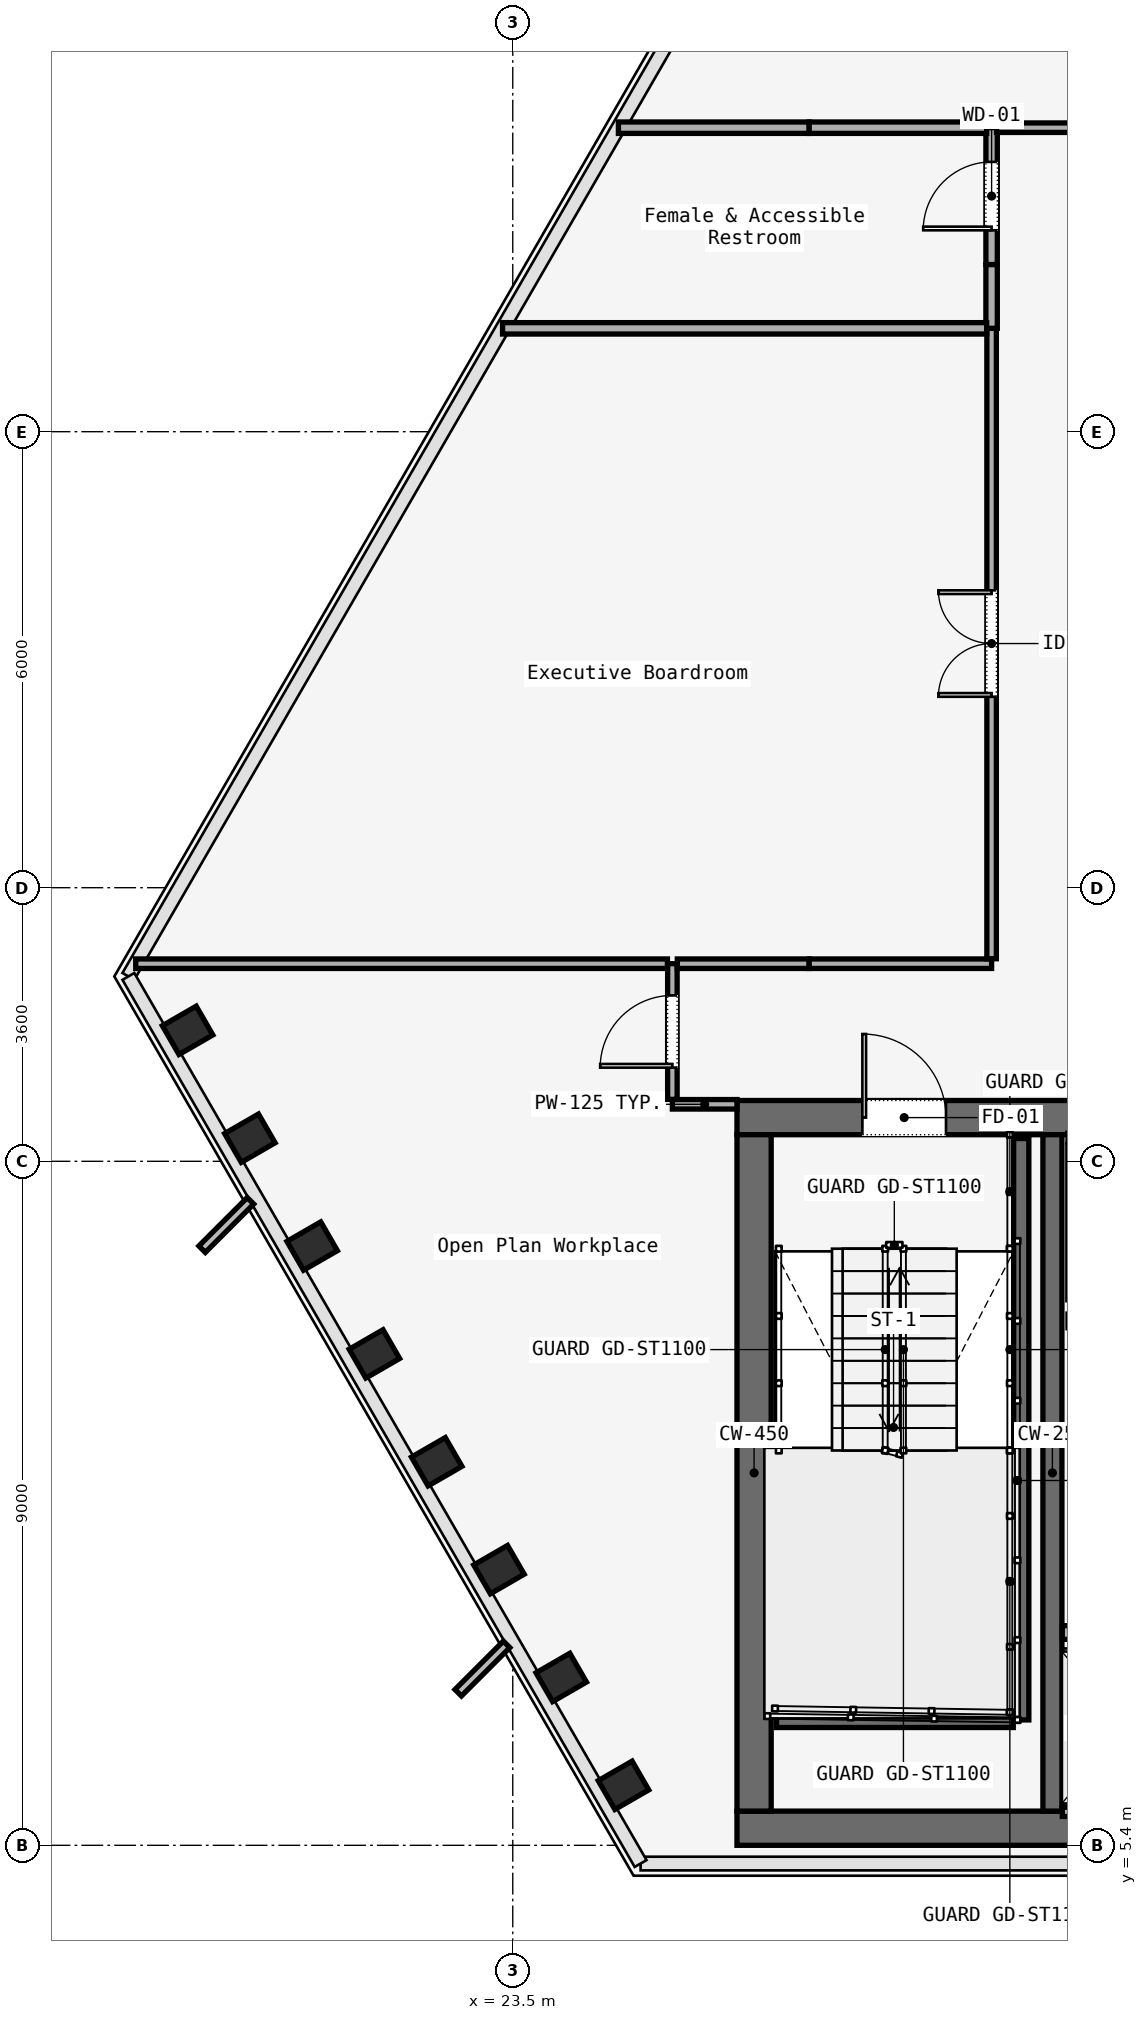
"""IFC4 building model, lengths in metres.
Left out: names, types, materials, properties, quantities, classifications, styles, units other than length and angle.
Written with IfcOpenShell. Run it as: python <this file> out.ifc"""

import sys

from ifc_helpers import new_model, si_unit, direction, frame, frame_2d, origin, origin_2d, place, context, subcontext, project, spatial, rectangle, i_section, extrude, element, fill, save


model = new_model("IFC4")
c1 = context("Model", 3, precision=1e-05, world=origin(), true_north=direction((0.0, 1.0)))
c2 = subcontext(c1, "Body", "Model", "MODEL_VIEW")
j1 = project(units=[si_unit("LENGTHUNIT", "METRE"), si_unit("PLANEANGLEUNIT", "RADIAN")], contexts=[c1])
p1 = place(None, origin())
s1 = spatial("IfcSite", under=j1, at=p1, CompositionType="ELEMENT")
p2 = place(p1, origin())
s2 = spatial("IfcBuilding", under=s1, at=p2, CompositionType="ELEMENT")
p3 = place(p2, frame((0.0, 0.0, 100.6)))
s3 = spatial("IfcBuildingStorey", under=s2, at=p3, CompositionType="ELEMENT", Elevation=100.6)
p4 = place(p3, frame((26.45, 14.975, 0.0), z_axis=(0.0, 0.0, 1.0), x_axis=(1.0, 0.0, 0.0)))
e1 = element("IfcWall", 1, at=p4, inside=s3, PredefinedType="SOLIDWALL", context=c2, shape_type="SweptSolid", body=[
    extrude(rectangle(XDim=31.1, YDim=0.45, at=frame_2d((15.55, 0.0))), origin(), (0.0, 0.0, 1.0), 3.58),
])
p5 = place(p4, frame((1.65, 0.0, 0.0)))
e2 = element("IfcOpeningElement", 2, at=p5, cuts=e1, PredefinedType="OPENING", context=c2, shape_type="SweptSolid", body=[
    extrude(rectangle(XDim=1.1, YDim=2.2, at=frame_2d((0.55, 1.1))), frame((0.0, 0.225, 0.0), z_axis=(0.0, -1.0, 0.0), x_axis=(1.0, 0.0, 0.0)), (0.0, 0.0, 1.0), 0.45),
])
p6 = place(p4, frame((13.65, 0.0, 0.0)))
e3 = element("IfcOpeningElement", 3, at=p6, cuts=e1, PredefinedType="OPENING", context=c2, shape_type="SweptSolid", body=[
    extrude(rectangle(XDim=1.1, YDim=2.2, at=frame_2d((0.55, 1.1))), frame((0.0, 0.225, 0.0), z_axis=(0.0, -1.0, 0.0), x_axis=(1.0, 0.0, 0.0)), (0.0, 0.0, 1.0), 0.45),
])
p7 = place(p4, frame((25.55, 0.0, 0.0)))
e4 = element("IfcOpeningElement", 4, at=p7, cuts=e1, PredefinedType="OPENING", context=c2, shape_type="SweptSolid", body=[
    extrude(rectangle(XDim=1.1, YDim=2.2, at=frame_2d((0.55, 1.1))), frame((0.0, 0.225, 0.0), z_axis=(0.0, -1.0, 0.0), x_axis=(1.0, 0.0, 0.0)), (0.0, 0.0, 1.0), 0.45),
])
p8 = place(p4, frame((10.7, 0.0, 0.0)))
e5 = element("IfcOpeningElement", 5, at=p8, cuts=e1, PredefinedType="OPENING", context=c2, shape_type="SweptSolid", body=[
    extrude(rectangle(XDim=1.4, YDim=2.2, at=frame_2d((0.7, 1.1))), frame((0.0, 0.225, 0.0), z_axis=(0.0, -1.0, 0.0), x_axis=(1.0, 0.0, 0.0)), (0.0, 0.0, 1.0), 0.45),
])
p9 = place(p4, frame((19.35, 0.0, 0.0)))
e6 = element("IfcOpeningElement", 6, at=p9, cuts=e1, PredefinedType="OPENING", context=c2, shape_type="SweptSolid", body=[
    extrude(rectangle(XDim=1.1, YDim=2.2, at=frame_2d((0.55, 1.1))), frame((0.0, 0.225, 0.0), z_axis=(0.0, -1.0, 0.0), x_axis=(1.0, 0.0, 0.0)), (0.0, 0.0, 1.0), 0.45),
])
p10 = place(p4, frame((21.4, 0.0, 0.0)))
e7 = element("IfcOpeningElement", 7, at=p10, cuts=e1, PredefinedType="OPENING", context=c2, shape_type="SweptSolid", body=[
    extrude(rectangle(XDim=0.9, YDim=2.1, at=frame_2d((0.45, 1.05))), frame((0.0, 0.225, 0.0), z_axis=(0.0, -1.0, 0.0), x_axis=(1.0, 0.0, 0.0)), (0.0, 0.0, 1.0), 0.45),
])
p11 = place(p4, frame((23.35, 0.0, 0.0)))
e8 = element("IfcOpeningElement", 8, at=p11, cuts=e1, PredefinedType="OPENING", context=c2, shape_type="SweptSolid", body=[
    extrude(rectangle(XDim=1.3, YDim=2.3, at=frame_2d((0.65, 1.15))), frame((0.0, 0.225, 0.0), z_axis=(0.0, -1.0, 0.0), x_axis=(1.0, 0.0, 0.0)), (0.0, 0.0, 1.0), 0.45),
])
p12 = place(p3, frame((26.45, 5.625, 0.0), z_axis=(0.0, 0.0, 1.0), x_axis=(1.0, 0.0, 0.0)))
e9 = element("IfcWall", 9, at=p12, inside=s3, PredefinedType="SOLIDWALL", context=c2, shape_type="SweptSolid", body=[
    extrude(rectangle(XDim=31.1, YDim=0.45, at=frame_2d((15.55, 0.0))), origin(), (0.0, 0.0, 1.0), 3.58),
])
p13 = place(p3, frame((26.675, 5.85, 0.0), z_axis=(0.0, 0.0, 1.0), x_axis=(0.0, 1.0, 0.0)))
e10 = element("IfcWall", 10, at=p13, inside=s3, PredefinedType="SOLIDWALL", context=c2, shape_type="SweptSolid", body=[
    extrude(rectangle(XDim=8.9, YDim=0.45, at=frame_2d((4.45, 0.0))), origin(), (0.0, 0.0, 1.0), 3.58),
])
p14 = place(p3, frame((30.6, 5.85, 0.0), z_axis=(0.0, 0.0, 1.0), x_axis=(0.0, 1.0, 0.0)))
e11 = element("IfcWall", 11, at=p14, inside=s3, PredefinedType="SOLIDWALL", context=c2, shape_type="SweptSolid", body=[
    extrude(rectangle(XDim=8.9, YDim=0.25, at=frame_2d((4.45, 0.0))), origin(), (0.0, 0.0, 1.0), 3.58),
])
for number, where, z_axis, x_axis in (
    (12, (19.222, 16.123, 0.0), (0.0, 0.0, 1.0), (-0.5, 0.866, 0.0)),
    (13, (20.041, 14.704, 0.0), (0.0, 0.0, 1.0), (-0.5, 0.866, 0.0)),
    (14, (20.861, 13.285, 0.0), (0.0, 0.0, 1.0), (-0.5, 0.866, 0.0)),
    (15, (21.68, 11.866, 0.0), (0.0, 0.0, 1.0), (-0.5, 0.866, 0.0)),
    (16, (22.499, 10.447, 0.0), (0.0, 0.0, 1.0), (-0.5, 0.866, 0.0)),
    (17, (23.318, 9.028, 0.0), (0.0, 0.0, 1.0), (-0.5, 0.866, 0.0)),
    (18, (24.138, 7.609, 0.0), (0.0, 0.0, 1.0), (-0.5, 0.866, 0.0)),
    (19, (24.957, 6.19, 0.0), (0.0, 0.0, 1.0), (-0.5, 0.866, 0.0)),
):
    element("IfcColumn", number, at=place(p3, frame(where, z_axis=z_axis, x_axis=x_axis)), inside=s3, PredefinedType="COLUMN", context=c2, shape_type="SweptSolid", body=[
        extrude(i_section(OverallWidth=0.437, OverallDepth=0.514, WebThickness=0.061, FlangeThickness=0.077, FilletRadius=0.015, at=origin_2d()), origin(), (0.0, 0.0, 1.0), 3.58),
    ])
p15 = place(p3, frame((30.19, 14.7, 0.0), z_axis=(0.0, 0.0, 1.0), x_axis=(0.0, -1.0, 0.0)))
e20 = element("IfcWall", 20, at=p15, inside=s3, PredefinedType="SOLIDWALL", context=c2, shape_type="SweptSolid", body=[
    extrude(rectangle(XDim=7.65, YDim=0.2, at=frame_2d((3.825, 0.0))), origin(), (0.0, 0.0, 1.0), 3.8),
])
p16 = place(p3, frame((26.97, 7.05, 0.0), z_axis=(0.0, 0.0, 1.0), x_axis=(1.0, 0.0, 0.0)))
e21 = element("IfcWall", 21, at=p16, inside=s3, PredefinedType="SOLIDWALL", context=c2, shape_type="SweptSolid", body=[
    extrude(rectangle(XDim=3.115, YDim=0.2, at=frame_2d((1.558, 0.0))), origin(), (0.0, 0.0, 1.0), 3.8),
])
p17 = place(p3, frame((30.73, 8.2, 0.0), z_axis=(0.0, 0.0, 1.0), x_axis=(1.0, 0.0, 0.0)))
e22 = element("IfcWall", 22, at=p17, inside=s3, PredefinedType="SOLIDWALL", context=c2, shape_type="SweptSolid", body=[
    extrude(rectangle(XDim=1.665, YDim=0.18, at=frame_2d((0.833, 0.0))), origin(), (0.0, 0.0, 1.0), 2.95),
])
p18 = place(p17, frame((0.282, 0.0, 0.0)))
e23 = element("IfcOpeningElement", 23, at=p18, cuts=e22, PredefinedType="OPENING", context=c2, shape_type="SweptSolid", body=[
    extrude(rectangle(XDim=1.1, YDim=2.2, at=frame_2d((0.55, 1.1))), frame((0.0, 0.09, 0.0), z_axis=(0.0, -1.0, 0.0), x_axis=(1.0, 0.0, 0.0)), (0.0, 0.0, 1.0), 0.18),
])
p19 = place(p3, frame((30.73, 5.84, 0.0), z_axis=(0.0, 0.0, 1.0), x_axis=(1.0, 0.0, 0.0)))
e24 = element("IfcWall", 24, at=p19, inside=s3, PredefinedType="SOLIDWALL", context=c2, shape_type="SweptSolid", body=[
    extrude(rectangle(XDim=1.665, YDim=0.12, at=frame_2d((0.833, 0.0))), origin(), (0.0, 0.0, 1.0), 2.95),
])
p20 = place(p3, frame((26.45, 15.15, 0.0), z_axis=(0.0, 0.0, 1.0), x_axis=(-1.0, 0.0, 0.0)))
e25 = element("IfcWall", 25, at=p20, inside=s3, PredefinedType="PARTITIONING", context=c2, shape_type="SweptSolid", body=[
    extrude(rectangle(XDim=0.85, YDim=0.125, at=frame_2d((0.425, 0.0))), origin(), (0.0, 0.0, 1.0), 2.95),
])
p21 = place(p3, frame((25.6, 15.215, 0.0), z_axis=(0.0, 0.0, 1.0), x_axis=(0.0, 1.0, 0.0)))
e26 = element("IfcWall", 26, at=p21, inside=s3, PredefinedType="PARTITIONING", context=c2, shape_type="SweptSolid", body=[
    extrude(rectangle(XDim=1.785, YDim=0.125, at=frame_2d((0.893, 0.0))), origin(), (0.0, 0.0, 1.0), 2.95),
])
p22 = place(p21, frame((0.417, 0.0, 0.0)))
e27 = element("IfcOpeningElement", 27, at=p22, cuts=e26, PredefinedType="OPENING", context=c2, shape_type="SweptSolid", body=[
    extrude(rectangle(XDim=0.95, YDim=2.2, at=frame_2d((0.475, 1.1))), frame((0.0, 0.062, 0.0), z_axis=(0.0, -1.0, 0.0), x_axis=(1.0, 0.0, 0.0)), (0.0, 0.0, 1.0), 0.125),
])
p23 = place(p3, frame((25.665, 17.0, 0.0), z_axis=(0.0, 0.0, 1.0), x_axis=(1.0, 0.0, 0.0)))
e28 = element("IfcWall", 28, at=p23, inside=s3, PredefinedType="PARTITIONING", context=c2, shape_type="SweptSolid", body=[
    extrude(rectangle(XDim=1.735, YDim=0.125, at=frame_2d((0.867, 0.0))), origin(), (0.0, 0.0, 1.0), 2.95),
])
p24 = place(p3, frame((27.4, 17.0, 0.0), z_axis=(0.0, 0.0, 1.0), x_axis=(1.0, 0.0, 0.0)))
e29 = element("IfcWall", 29, at=p24, inside=s3, PredefinedType="PARTITIONING", context=c2, shape_type="SweptSolid", body=[
    extrude(rectangle(XDim=2.4, YDim=0.125, at=frame_2d((1.2, 0.0))), origin(), (0.0, 0.0, 1.0), 2.95),
])
p25 = place(p3, frame((29.8, 17.065, 0.0), z_axis=(0.0, 0.0, 1.0), x_axis=(0.0, 1.0, 0.0)))
e30 = element("IfcWall", 30, at=p25, inside=s3, PredefinedType="PARTITIONING", context=c2, shape_type="SweptSolid", body=[
    extrude(rectangle(XDim=8.295, YDim=0.125, at=frame_2d((4.147, 0.0))), origin(), (0.0, 0.0, 1.0), 2.95),
])
p26 = place(p25, frame((3.448, 0.0, 0.0)))
e31 = element("IfcOpeningElement", 31, at=p26, cuts=e30, PredefinedType="OPENING", context=c2, shape_type="SweptSolid", body=[
    extrude(rectangle(XDim=1.4, YDim=2.2, at=frame_2d((0.7, 1.1))), frame((0.0, 0.062, 0.0), z_axis=(0.0, -1.0, 0.0), x_axis=(1.0, 0.0, 0.0)), (0.0, 0.0, 1.0), 0.125),
])
p27 = place(p3, frame((29.8, 25.36, 0.0), z_axis=(0.0, 0.0, 1.0), x_axis=(0.0, 1.0, 0.0)))
e32 = element("IfcWall", 32, at=p27, inside=s3, PredefinedType="PARTITIONING", context=c2, shape_type="SweptSolid", body=[
    extrude(rectangle(XDim=0.84, YDim=0.15, at=frame_2d((0.42, 0.0))), origin(), (0.0, 0.0, 1.0), 2.95),
])
p28 = place(p3, frame((29.8, 26.2, 0.0), z_axis=(0.0, 0.0, 1.0), x_axis=(0.0, 1.0, 0.0)))
e33 = element("IfcWall", 33, at=p28, inside=s3, PredefinedType="PARTITIONING", context=c2, shape_type="SweptSolid", body=[
    extrude(rectangle(XDim=1.8, YDim=0.15, at=frame_2d((0.9, 0.0))), origin(), (0.0, 0.0, 1.0), 2.95),
])
p29 = place(p28, frame((0.45, 0.0, 0.0)))
e34 = element("IfcOpeningElement", 34, at=p29, cuts=e33, PredefinedType="OPENING", context=c2, shape_type="SweptSolid", body=[
    extrude(rectangle(XDim=0.9, YDim=2.15, at=frame_2d((0.45, 1.075))), frame((0.0, 0.075, 0.0), z_axis=(0.0, -1.0, 0.0), x_axis=(1.0, 0.0, 0.0)), (0.0, 0.0, 1.0), 0.15),
])
p30 = place(p3, frame((29.865, 28.0, 0.0), z_axis=(0.0, 0.0, 1.0), x_axis=(1.0, 0.0, 0.0)))
e35 = element("IfcWall", 35, at=p30, inside=s3, PredefinedType="PARTITIONING", context=c2, shape_type="SweptSolid", body=[
    extrude(rectangle(XDim=1.735, YDim=0.125, at=frame_2d((0.868, 0.0))), origin(), (0.0, 0.0, 1.0), 2.95),
])
p31 = place(p3, frame((18.539, 17.0, 0.0), z_axis=(0.0, 0.0, 1.0), x_axis=(1.0, 0.0, 0.0)))
e36 = element("IfcWall", 36, at=p31, inside=s3, PredefinedType="PARTITIONING", context=c2, shape_type="SweptSolid", body=[
    extrude(rectangle(XDim=6.996, YDim=0.125, at=frame_2d((3.498, 0.0))), origin(), (0.0, 0.0, 1.0), 2.95),
])
p32 = place(p3, frame((23.366, 25.36, 0.0), z_axis=(0.0, 0.0, 1.0), x_axis=(1.0, 0.0, 0.0)))
e37 = element("IfcWall", 37, at=p32, inside=s3, PredefinedType="PARTITIONING", context=c2, shape_type="SweptSolid", body=[
    extrude(rectangle(XDim=6.369, YDim=0.15, at=frame_2d((3.185, 0.0))), origin(), (0.0, 0.0, 1.0), 2.95),
])
p33 = place(p3, frame((24.89, 28.0, 0.0), z_axis=(0.0, 0.0, 1.0), x_axis=(1.0, 0.0, 0.0)))
e38 = element("IfcWall", 38, at=p33, inside=s3, PredefinedType="PARTITIONING", context=c2, shape_type="SweptSolid", body=[
    extrude(rectangle(XDim=2.51, YDim=0.15, at=frame_2d((1.255, 0.0))), origin(), (0.0, 0.0, 1.0), 2.95),
])
p34 = place(p3, frame((27.4, 28.0, 0.0), z_axis=(0.0, 0.0, 1.0), x_axis=(1.0, 0.0, 0.0)))
e39 = element("IfcWall", 39, at=p34, inside=s3, PredefinedType="PARTITIONING", context=c2, shape_type="SweptSolid", body=[
    extrude(rectangle(XDim=2.335, YDim=0.15, at=frame_2d((1.167, 0.0))), origin(), (0.0, 0.0, 1.0), 2.95),
])
p35 = place(p5, origin())
e40 = element("IfcDoor", 40, at=p35, inside=s3, OperationType="SINGLE_SWING_RIGHT", PredefinedType="DOOR", context=c2, shape_type="SweptSolid", body=[
    extrude(rectangle(XDim=1.1, YDim=2.2, at=frame_2d((0.55, 1.1))), frame((0.0, 0.025, 0.0), z_axis=(0.0, -1.0, 0.0), x_axis=(1.0, 0.0, 0.0)), (0.0, 0.0, 1.0), 0.05),
])
fill(e2, e40)
p36 = place(p22, origin())
e41 = element("IfcDoor", 41, at=p36, inside=s3, OperationType="SINGLE_SWING_RIGHT", PredefinedType="DOOR", context=c2, shape_type="SweptSolid", body=[
    extrude(rectangle(XDim=0.95, YDim=2.2, at=frame_2d((0.475, 1.1))), frame((0.0, 0.025, 0.0), z_axis=(0.0, -1.0, 0.0), x_axis=(1.0, 0.0, 0.0)), (0.0, 0.0, 1.0), 0.05),
])
fill(e27, e41)
p37 = place(p26, origin())
e42 = element("IfcDoor", 42, at=p37, inside=s3, OperationType="SINGLE_SWING_RIGHT", PredefinedType="DOOR", context=c2, shape_type="SweptSolid", body=[
    extrude(rectangle(XDim=1.4, YDim=2.2, at=frame_2d((0.7, 1.1))), frame((0.0, 0.025, 0.0), z_axis=(0.0, -1.0, 0.0), x_axis=(1.0, 0.0, 0.0)), (0.0, 0.0, 1.0), 0.05),
])
fill(e31, e42)
p38 = place(p29, origin())
e43 = element("IfcDoor", 43, at=p38, inside=s3, OperationType="SINGLE_SWING_LEFT", PredefinedType="DOOR", context=c2, shape_type="SweptSolid", body=[
    extrude(rectangle(XDim=0.9, YDim=2.15, at=frame_2d((0.45, 1.075))), frame((0.0, 0.025, 0.0), z_axis=(0.0, -1.0, 0.0), x_axis=(1.0, 0.0, 0.0)), (0.0, 0.0, 1.0), 0.05),
])
fill(e34, e43)
save(model, sys.argv[1])
